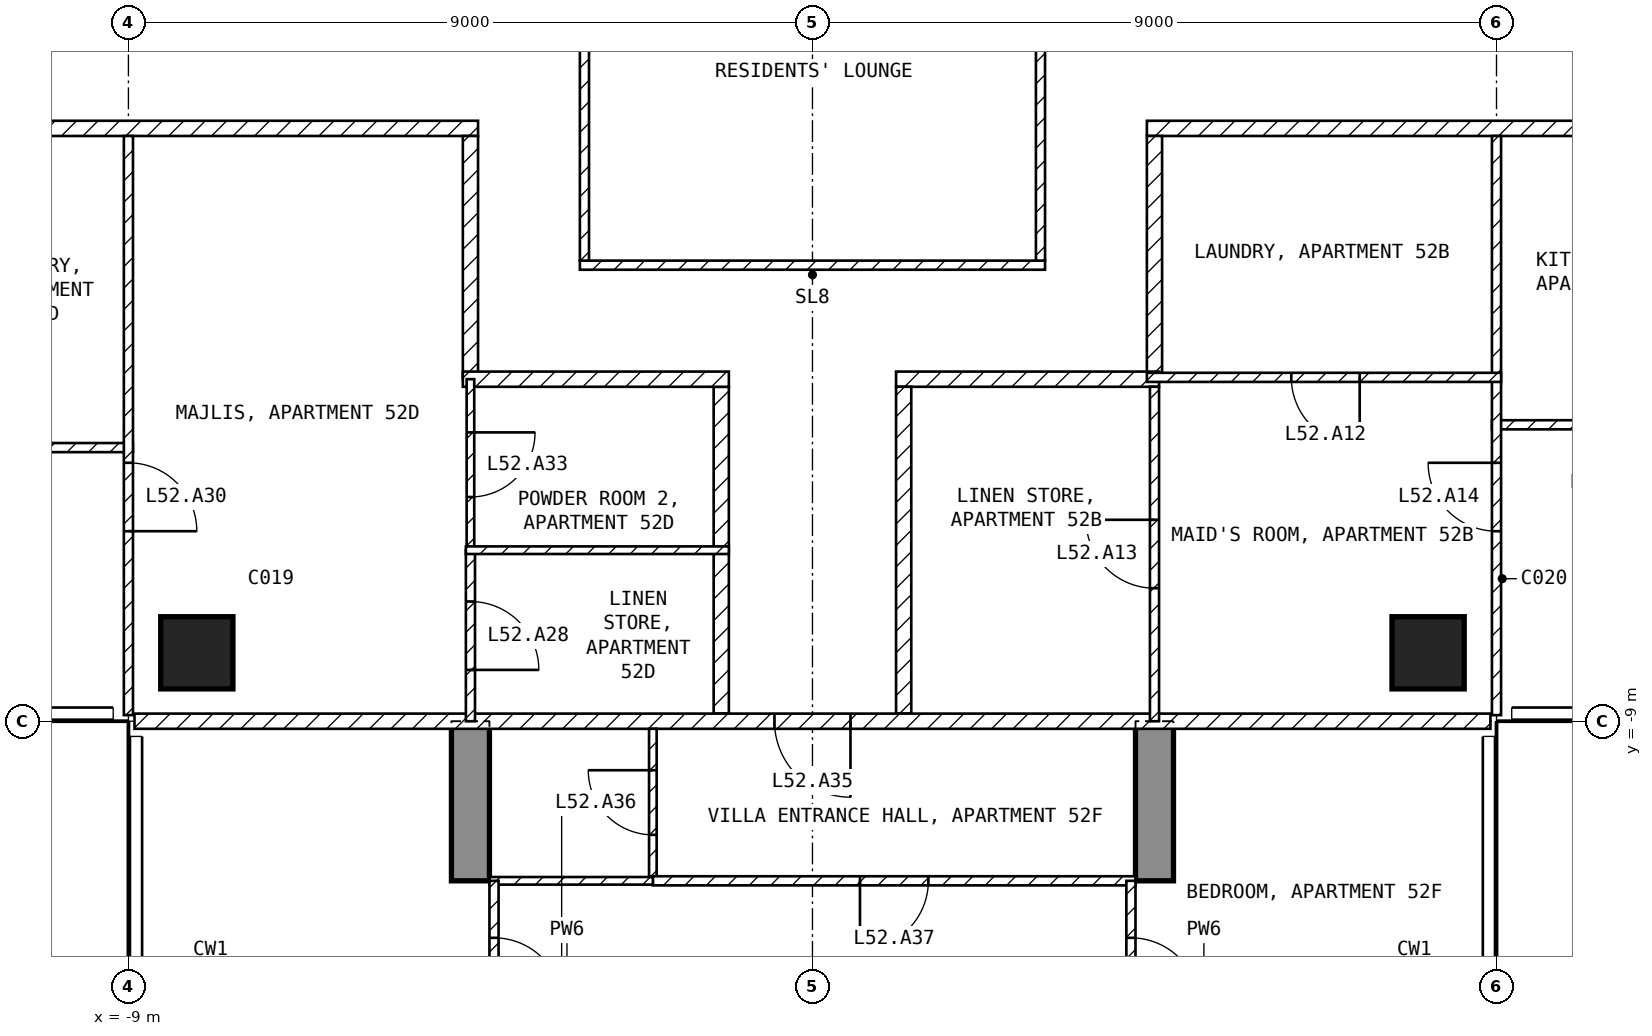
"""IFC4 building model, lengths in metres.
Left out: names, types, materials, properties, quantities, classifications, styles, units other than length and angle.
Written with IfcOpenShell. Run it as: python <this file> out.ifc"""

import sys

from ifc_helpers import new_model, si_unit, direction, frame, frame_2d, origin, origin_2d, place, context, subcontext, project, spatial, polyline, rectangle, outline, extrude, element, fill, save


model = new_model("IFC4")
c1 = context("Model", 3, precision=1e-05, world=origin(), true_north=direction((0.0, 1.0)))
c2 = subcontext(c1, "Body", "Model", "MODEL_VIEW")
j1 = project(units=[si_unit("LENGTHUNIT", "METRE"), si_unit("PLANEANGLEUNIT", "RADIAN")], contexts=[c1])
p1 = place(None, origin())
s1 = spatial("IfcSite", under=j1, at=p1, CompositionType="ELEMENT")
p2 = place(p1, origin())
s2 = spatial("IfcBuilding", under=s1, at=p2, CompositionType="ELEMENT")
p3 = place(p2, frame((0.0, 0.0, 208.6)))
s3 = spatial("IfcBuildingStorey", under=s2, at=p3, CompositionType="ELEMENT", Elevation=208.6)
for number, where, z_axis, x_axis in (
    (1, (-8.1, -8.1, -0.25), (0.0, 0.0, 1.0), (1.0, 0.0, 0.0)),
    (2, (8.1, -8.1, -0.25), (0.0, 0.0, 1.0), (1.0, 0.0, 0.0)),
):
    element("IfcColumn", number, at=place(p3, frame(where, z_axis=z_axis, x_axis=x_axis)), inside=s3, PredefinedType="COLUMN", context=c2, shape_type="SweptSolid", body=[
        extrude(rectangle(XDim=0.95, YDim=0.95, at=origin_2d()), origin(), (0.0, 0.0, 1.0), 3.5),
    ])
for number, where, z_axis, x_axis in (
    (3, (-4.75, -20.225, -0.25), (1.0, 0.0, 0.0), (0.0, 1.0, 0.0)),
    (4, (4.25, -20.225, -0.25), (1.0, 0.0, 0.0), (0.0, 1.0, 0.0)),
):
    element("IfcWall", number, at=place(p3, frame(where, z_axis=z_axis, x_axis=x_axis)), inside=s3, PredefinedType="SHEAR", context=c2, shape_type="SweptSolid", body=[
        extrude(outline(polyline([(0.0, 0.0), (6.725, 0.0), (6.725, 2.65), (9.125, 2.65), (9.125, 0.0), (11.225, 0.0), (11.225, 3.5), (0.0, 3.5), (0.0, 0.0)])), origin(), (0.0, 0.0, 1.0), 0.5),
    ])
p4 = place(p3, frame((-3.06, -3.0, 0.0), z_axis=(0.0, 0.0, 1.0), x_axis=(1.0, 0.0, 0.0)))
e5 = element("IfcWall", 5, at=p4, inside=s3, PredefinedType="PARTITIONING", context=c2, shape_type="SweptSolid", body=[
    extrude(rectangle(XDim=6.12, YDim=0.12, at=frame_2d((3.06, 0.0))), origin(), (0.0, 0.0, 1.0), 3.25),
])
for number, where, z_axis, x_axis in (
    (6, (3.0, -2.94, 0.0), (0.0, 0.0, 1.0), (0.0, 1.0, 0.0)),
    (7, (-3.0, 2.94, 0.0), (0.0, 0.0, 1.0), (0.0, -1.0, 0.0)),
):
    element("IfcWall", number, at=place(p3, frame(where, z_axis=z_axis, x_axis=x_axis)), inside=s3, PredefinedType="PARTITIONING", context=c2, shape_type="SweptSolid", body=[
        extrude(rectangle(XDim=5.88, YDim=0.12, at=frame_2d((2.94, 0.0))), origin(), (0.0, 0.0, 1.0), 3.25),
    ])
p5 = place(p3, frame((21.6, -1.2, 0.0), z_axis=(0.0, 0.0, 1.0), x_axis=(-1.0, 0.0, 0.0)))
e8 = element("IfcWall", 8, at=p5, inside=s3, PredefinedType="PARTITIONING", context=c2, shape_type="SweptSolid", body=[
    extrude(rectangle(XDim=17.2, YDim=0.2, at=frame_2d((8.6, 0.0))), origin(), (0.0, 0.0, 1.0), 3.25),
])
p6 = place(p5, frame((4.675, 0.0, 0.0)))
e9 = element("IfcOpeningElement", 9, at=p6, cuts=e8, PredefinedType="OPENING", context=c2, shape_type="SweptSolid", body=[
    extrude(rectangle(XDim=1.0, YDim=2.1, at=frame_2d((0.5, 1.05))), frame((0.0, 0.11, 0.0), z_axis=(0.0, -1.0, 0.0), x_axis=(1.0, 0.0, 0.0)), (0.0, 0.0, 1.0), 0.22),
])
p7 = place(p3, frame((4.5, -1.3, 0.0), z_axis=(0.0, 0.0, 1.0), x_axis=(0.0, -1.0, 0.0)))
e10 = element("IfcWall", 10, at=p7, inside=s3, PredefinedType="PARTITIONING", context=c2, shape_type="SweptSolid", body=[
    extrude(rectangle(XDim=3.116, YDim=0.2, at=frame_2d((1.558, 0.0))), origin(), (0.0, 0.0, 1.0), 3.25),
])
p8 = place(p3, frame((4.56, -4.5, 0.0), z_axis=(0.0, 0.0, 1.0), x_axis=(-1.0, 0.0, 0.0)))
e11 = element("IfcWall", 11, at=p8, inside=s3, PredefinedType="PARTITIONING", context=c2, shape_type="SweptSolid", body=[
    extrude(rectangle(XDim=3.46, YDim=0.2, at=frame_2d((1.73, 0.0))), origin(), (0.0, 0.0, 1.0), 3.25),
])
p9 = place(p3, frame((1.2, -4.6, 0.0), z_axis=(0.0, 0.0, 1.0), x_axis=(0.0, -1.0, 0.0)))
e12 = element("IfcWall", 12, at=p9, inside=s3, PredefinedType="PARTITIONING", context=c2, shape_type="SweptSolid", body=[
    extrude(rectangle(XDim=4.3, YDim=0.2, at=frame_2d((2.15, 0.0))), origin(), (0.0, 0.0, 1.0), 3.25),
])
p10 = place(p3, frame((-4.4, -1.2, 0.0), z_axis=(0.0, 0.0, 1.0), x_axis=(-1.0, 0.0, 0.0)))
e13 = element("IfcWall", 13, at=p10, inside=s3, PredefinedType="PARTITIONING", context=c2, shape_type="SweptSolid", body=[
    extrude(rectangle(XDim=17.2, YDim=0.2, at=frame_2d((8.6, 0.0))), origin(), (0.0, 0.0, 1.0), 3.25),
])
p11 = place(p10, frame((7.7, 0.0, 0.0)))
e14 = element("IfcOpeningElement", 14, at=p11, cuts=e13, PredefinedType="OPENING", context=c2, shape_type="SweptSolid", body=[
    extrude(rectangle(XDim=1.0, YDim=2.1, at=frame_2d((0.5, 1.05))), frame((0.0, 0.11, 0.0), z_axis=(0.0, -1.0, 0.0), x_axis=(1.0, 0.0, 0.0)), (0.0, 0.0, 1.0), 0.22),
])
p12 = place(p3, frame((-4.5, -4.5, 0.0), z_axis=(0.0, 0.0, 1.0), x_axis=(0.0, 1.0, 0.0)))
e15 = element("IfcWall", 15, at=p12, inside=s3, PredefinedType="PARTITIONING", context=c2, shape_type="SweptSolid", body=[
    extrude(rectangle(XDim=3.2, YDim=0.2, at=frame_2d((1.6, 0.0))), origin(), (0.0, 0.0, 1.0), 3.25),
])
p13 = place(p3, frame((-1.2, -8.9, 0.0), z_axis=(0.0, 0.0, 1.0), x_axis=(0.0, 1.0, 0.0)))
e16 = element("IfcWall", 16, at=p13, inside=s3, PredefinedType="PARTITIONING", context=c2, shape_type="SweptSolid", body=[
    extrude(rectangle(XDim=4.3, YDim=0.2, at=frame_2d((2.15, 0.0))), origin(), (0.0, 0.0, 1.0), 3.25),
])
p14 = place(p3, frame((-1.1, -4.5, 0.0), z_axis=(0.0, 0.0, 1.0), x_axis=(-1.0, 0.0, 0.0)))
e17 = element("IfcWall", 17, at=p14, inside=s3, PredefinedType="PARTITIONING", context=c2, shape_type="SweptSolid", body=[
    extrude(rectangle(XDim=3.5, YDim=0.2, at=frame_2d((1.75, 0.0))), origin(), (0.0, 0.0, 1.0), 3.25),
])
p15 = place(p3, frame((8.92, -9.0, 0.0), z_axis=(0.0, 0.0, 1.0), x_axis=(-1.0, 0.0, 0.0)))
e18 = element("IfcWall", 18, at=p15, inside=s3, PredefinedType="PARTITIONING", context=c2, shape_type="SweptSolid", body=[
    extrude(rectangle(XDim=17.84, YDim=0.2, at=frame_2d((8.92, 0.0))), origin(), (0.0, 0.0, 1.0), 3.25),
])
p16 = place(p15, frame((8.42, 0.0, 0.0)))
e19 = element("IfcOpeningElement", 19, at=p16, cuts=e18, PredefinedType="OPENING", context=c2, shape_type="SweptSolid", body=[
    extrude(rectangle(XDim=1.0, YDim=2.1, at=frame_2d((0.5, 1.05))), frame((0.0, 0.11, 0.0), z_axis=(0.0, -1.0, 0.0), x_axis=(1.0, 0.0, 0.0)), (0.0, 0.0, 1.0), 0.22),
])
p17 = place(p3, frame((19.5, -5.1, 0.0), z_axis=(0.0, 0.0, 1.0), x_axis=(-1.0, 0.0, 0.0)))
e20 = element("IfcWall", 20, at=p17, inside=s3, PredefinedType="PARTITIONING", context=c2, shape_type="SweptSolid", body=[
    extrude(rectangle(XDim=10.56, YDim=0.12, at=frame_2d((5.28, 0.0))), origin(), (0.0, 0.0, 1.0), 3.25),
])
p18 = place(p17, frame((8.55, 0.0, 0.0)))
e21 = element("IfcOpeningElement", 21, at=p18, cuts=e20, PredefinedType="OPENING", context=c2, shape_type="SweptSolid", body=[
    extrude(rectangle(XDim=0.9, YDim=2.1, at=frame_2d((0.45, 1.05))), frame((0.0, 0.07, 0.0), z_axis=(0.0, -1.0, 0.0), x_axis=(1.0, 0.0, 0.0)), (0.0, 0.0, 1.0), 0.14),
])
p19 = place(p17, frame((2.625, 0.0, 0.0)))
e22 = element("IfcOpeningElement", 22, at=p19, cuts=e20, PredefinedType="OPENING", context=c2, shape_type="SweptSolid", body=[
    extrude(rectangle(XDim=0.9, YDim=2.1, at=frame_2d((0.45, 1.05))), frame((0.0, 0.07, 0.0), z_axis=(0.0, -1.0, 0.0), x_axis=(1.0, 0.0, 0.0)), (0.0, 0.0, 1.0), 0.14),
])
p20 = place(p3, frame((9.0, -8.92, 0.0), z_axis=(0.0, 0.0, 1.0), x_axis=(0.0, 1.0, 0.0)))
e23 = element("IfcWall", 23, at=p20, inside=s3, PredefinedType="PARTITIONING", context=c2, shape_type="SweptSolid", body=[
    extrude(rectangle(XDim=7.62, YDim=0.12, at=frame_2d((3.81, 0.0))), origin(), (0.0, 0.0, 1.0), 3.25),
])
p21 = place(p20, frame((2.42, 0.0, 0.0)))
e24 = element("IfcOpeningElement", 24, at=p21, cuts=e23, PredefinedType="OPENING", context=c2, shape_type="SweptSolid", body=[
    extrude(rectangle(XDim=0.9, YDim=2.1, at=frame_2d((0.45, 1.05))), frame((0.0, 0.07, 0.0), z_axis=(0.0, -1.0, 0.0), x_axis=(1.0, 0.0, 0.0)), (0.0, 0.0, 1.0), 0.14),
])
p22 = place(p3, frame((9.06, -4.476, 0.0), z_axis=(0.0, 0.0, 1.0), x_axis=(-1.0, 0.0, 0.0)))
e25 = element("IfcWall", 25, at=p22, inside=s3, PredefinedType="PARTITIONING", context=c2, shape_type="SweptSolid", body=[
    extrude(rectangle(XDim=4.66, YDim=0.12, at=frame_2d((2.33, 0.0))), origin(), (0.0, 0.0, 1.0), 3.25),
])
p23 = place(p22, frame((1.86, 0.0, 0.0)))
e26 = element("IfcOpeningElement", 26, at=p23, cuts=e25, PredefinedType="OPENING", context=c2, shape_type="SweptSolid", body=[
    extrude(rectangle(XDim=0.9, YDim=2.1, at=frame_2d((0.45, 1.05))), frame((0.0, 0.07, 0.0), z_axis=(0.0, -1.0, 0.0), x_axis=(1.0, 0.0, 0.0)), (0.0, 0.0, 1.0), 0.14),
])
p24 = place(p3, frame((4.5, -9.0, 0.0), z_axis=(0.0, 0.0, 1.0), x_axis=(0.0, 1.0, 0.0)))
e27 = element("IfcWall", 27, at=p24, inside=s3, PredefinedType="PARTITIONING", context=c2, shape_type="SweptSolid", body=[
    extrude(rectangle(XDim=4.4, YDim=0.12, at=frame_2d((2.2, 0.0))), origin(), (0.0, 0.0, 1.0), 3.25),
])
p25 = place(p24, frame((1.75, 0.0, 0.0)))
e28 = element("IfcOpeningElement", 28, at=p25, cuts=e27, PredefinedType="OPENING", context=c2, shape_type="SweptSolid", body=[
    extrude(rectangle(XDim=0.9, YDim=2.1, at=frame_2d((0.45, 1.05))), frame((0.0, 0.07, 0.0), z_axis=(0.0, -1.0, 0.0), x_axis=(1.0, 0.0, 0.0)), (0.0, 0.0, 1.0), 0.14),
])
p26 = place(p3, frame((-8.94, -5.4, 0.0), z_axis=(0.0, 0.0, 1.0), x_axis=(-1.0, 0.0, 0.0)))
e29 = element("IfcWall", 29, at=p26, inside=s3, PredefinedType="PARTITIONING", context=c2, shape_type="SweptSolid", body=[
    extrude(rectangle(XDim=9.51, YDim=0.12, at=frame_2d((4.755, 0.0))), origin(), (0.0, 0.0, 1.0), 3.25),
])
p27 = place(p26, frame((3.21, 0.0, 0.0)))
e30 = element("IfcOpeningElement", 30, at=p27, cuts=e29, PredefinedType="OPENING", context=c2, shape_type="SweptSolid", body=[
    extrude(rectangle(XDim=0.9, YDim=2.1, at=frame_2d((0.45, 1.05))), frame((0.0, 0.07, 0.0), z_axis=(0.0, -1.0, 0.0), x_axis=(1.0, 0.0, 0.0)), (0.0, 0.0, 1.0), 0.14),
])
p28 = place(p3, frame((-9.0, -1.3, 0.0), z_axis=(0.0, 0.0, 1.0), x_axis=(0.0, -1.0, 0.0)))
e31 = element("IfcWall", 31, at=p28, inside=s3, PredefinedType="PARTITIONING", context=c2, shape_type="SweptSolid", body=[
    extrude(rectangle(XDim=7.62, YDim=0.12, at=frame_2d((3.81, 0.0))), origin(), (0.0, 0.0, 1.0), 3.25),
])
p29 = place(p28, frame((4.3, 0.0, 0.0)))
e32 = element("IfcOpeningElement", 32, at=p29, cuts=e31, PredefinedType="OPENING", context=c2, shape_type="SweptSolid", body=[
    extrude(rectangle(XDim=0.9, YDim=2.1, at=frame_2d((0.45, 1.05))), frame((0.0, 0.07, 0.0), z_axis=(0.0, -1.0, 0.0), x_axis=(1.0, 0.0, 0.0)), (0.0, 0.0, 1.0), 0.14),
])
p30 = place(p3, frame((-4.5, -4.5, 0.0), z_axis=(0.0, 0.0, 1.0), x_axis=(0.0, -1.0, 0.0)))
e33 = element("IfcWall", 33, at=p30, inside=s3, PredefinedType="PARTITIONING", context=c2, shape_type="SweptSolid", body=[
    extrude(rectangle(XDim=2.25, YDim=0.1, at=frame_2d((1.125, 0.0))), origin(), (0.0, 0.0, 1.0), 3.25),
])
p31 = place(p30, frame((0.7, 0.0, 0.0)))
e34 = element("IfcOpeningElement", 34, at=p31, cuts=e33, PredefinedType="OPENING", context=c2, shape_type="SweptSolid", body=[
    extrude(rectangle(XDim=0.85, YDim=2.1, at=frame_2d((0.425, 1.05))), frame((0.0, 0.06, 0.0), z_axis=(0.0, -1.0, 0.0), x_axis=(1.0, 0.0, 0.0)), (0.0, 0.0, 1.0), 0.12),
])
p32 = place(p3, frame((-4.5, -6.75, 0.0), z_axis=(0.0, 0.0, 1.0), x_axis=(0.0, -1.0, 0.0)))
e35 = element("IfcWall", 35, at=p32, inside=s3, PredefinedType="PARTITIONING", context=c2, shape_type="SweptSolid", body=[
    extrude(rectangle(XDim=2.25, YDim=0.12, at=frame_2d((1.125, 0.0))), origin(), (0.0, 0.0, 1.0), 3.25),
])
p33 = place(p32, frame((0.675, 0.0, 0.0)))
e36 = element("IfcOpeningElement", 36, at=p33, cuts=e35, PredefinedType="OPENING", context=c2, shape_type="SweptSolid", body=[
    extrude(rectangle(XDim=0.9, YDim=2.1, at=frame_2d((0.45, 1.05))), frame((0.0, 0.07, 0.0), z_axis=(0.0, -1.0, 0.0), x_axis=(1.0, 0.0, 0.0)), (0.0, 0.0, 1.0), 0.14),
])
p34 = place(p3, frame((-1.1, -6.75, 0.0), z_axis=(0.0, 0.0, 1.0), x_axis=(-1.0, 0.0, 0.0)))
e37 = element("IfcWall", 37, at=p34, inside=s3, PredefinedType="PARTITIONING", context=c2, shape_type="SweptSolid", body=[
    extrude(rectangle(XDim=3.46, YDim=0.1, at=frame_2d((1.73, 0.0))), origin(), (0.0, 0.0, 1.0), 3.25),
])
p35 = place(p3, frame((-2.1, -11.04, 0.0), z_axis=(0.0, 0.0, 1.0), x_axis=(0.0, 1.0, 0.0)))
e38 = element("IfcWall", 38, at=p35, inside=s3, PredefinedType="PARTITIONING", context=c2, shape_type="SweptSolid", body=[
    extrude(rectangle(XDim=1.94, YDim=0.1, at=frame_2d((0.97, 0.0))), origin(), (0.0, 0.0, 1.0), 3.25),
])
p36 = place(p35, frame((0.545, 0.0, 0.0)))
e39 = element("IfcOpeningElement", 39, at=p36, cuts=e38, PredefinedType="OPENING", context=c2, shape_type="SweptSolid", body=[
    extrude(rectangle(XDim=0.85, YDim=2.1, at=frame_2d((0.425, 1.05))), frame((0.0, 0.06, 0.0), z_axis=(0.0, -1.0, 0.0), x_axis=(1.0, 0.0, 0.0)), (0.0, 0.0, 1.0), 0.12),
])
p37 = place(p3, frame((4.25, -11.1, 0.0), z_axis=(0.0, 0.0, 1.0), x_axis=(-1.0, 0.0, 0.0)))
e40 = element("IfcWall", 40, at=p37, inside=s3, PredefinedType="PARTITIONING", context=c2, shape_type="SweptSolid", body=[
    extrude(rectangle(XDim=6.35, YDim=0.12, at=frame_2d((3.175, 0.0))), origin(), (0.0, 0.0, 1.0), 3.25),
])
p38 = place(p37, frame((2.725, 0.0, 0.0)))
e41 = element("IfcOpeningElement", 41, at=p38, cuts=e40, PredefinedType="OPENING", context=c2, shape_type="SweptSolid", body=[
    extrude(rectangle(XDim=0.9, YDim=2.1, at=frame_2d((0.45, 1.05))), frame((0.0, 0.07, 0.0), z_axis=(0.0, -1.0, 0.0), x_axis=(1.0, 0.0, 0.0)), (0.0, 0.0, 1.0), 0.14),
])
p39 = place(p3, frame((-2.1, -11.1, 0.0), z_axis=(0.0, 0.0, 1.0), x_axis=(-1.0, 0.0, 0.0)))
e42 = element("IfcWall", 42, at=p39, inside=s3, PredefinedType="PARTITIONING", context=c2, shape_type="SweptSolid", body=[
    extrude(rectangle(XDim=2.15, YDim=0.1, at=frame_2d((1.075, 0.0))), origin(), (0.0, 0.0, 1.0), 3.25),
])
p40 = place(p3, frame((4.19, -11.1, 0.0), z_axis=(0.0, 0.0, 1.0), x_axis=(0.0, -1.0, 0.0)))
e43 = element("IfcWall", 43, at=p40, inside=s3, PredefinedType="PARTITIONING", context=c2, shape_type="SweptSolid", body=[
    extrude(rectangle(XDim=2.4, YDim=0.12, at=frame_2d((1.2, 0.0))), origin(), (0.0, 0.0, 1.0), 2.4),
])
p41 = place(p40, frame((0.75, 0.0, 0.0)))
e44 = element("IfcOpeningElement", 44, at=p41, cuts=e43, PredefinedType="OPENING", context=c2, shape_type="SweptSolid", body=[
    extrude(rectangle(XDim=0.9, YDim=2.1, at=frame_2d((0.45, 1.05))), frame((0.0, 0.07, 0.0), z_axis=(0.0, -1.0, 0.0), x_axis=(1.0, 0.0, 0.0)), (0.0, 0.0, 1.0), 0.14),
])
p42 = place(p3, frame((-4.19, -11.1, 0.0), z_axis=(0.0, 0.0, 1.0), x_axis=(0.0, -1.0, 0.0)))
e45 = element("IfcWall", 45, at=p42, inside=s3, PredefinedType="PARTITIONING", context=c2, shape_type="SweptSolid", body=[
    extrude(rectangle(XDim=2.4, YDim=0.12, at=frame_2d((1.2, 0.0))), origin(), (0.0, 0.0, 1.0), 2.4),
])
p43 = place(p42, frame((0.75, 0.0, 0.0)))
e46 = element("IfcOpeningElement", 46, at=p43, cuts=e45, PredefinedType="OPENING", context=c2, shape_type="SweptSolid", body=[
    extrude(rectangle(XDim=0.9, YDim=2.1, at=frame_2d((0.45, 1.05))), frame((0.0, 0.07, 0.0), z_axis=(0.0, -1.0, 0.0), x_axis=(1.0, 0.0, 0.0)), (0.0, 0.0, 1.0), 0.14),
])
p44 = place(p23, origin())
e47 = element("IfcDoor", 47, at=p44, inside=s3, OperationType="SINGLE_SWING_LEFT", PredefinedType="DOOR", context=c2, shape_type="SweptSolid", body=[
    extrude(rectangle(XDim=0.9, YDim=2.1, at=frame_2d((0.45, 1.05))), frame((0.0, 0.025, 0.0), z_axis=(0.0, -1.0, 0.0), x_axis=(1.0, 0.0, 0.0)), (0.0, 0.0, 1.0), 0.05),
])
fill(e26, e47)
p45 = place(p25, origin())
e48 = element("IfcDoor", 48, at=p45, inside=s3, OperationType="SINGLE_SWING_RIGHT", PredefinedType="DOOR", context=c2, shape_type="SweptSolid", body=[
    extrude(rectangle(XDim=0.9, YDim=2.1, at=frame_2d((0.45, 1.05))), frame((0.0, 0.025, 0.0), z_axis=(0.0, -1.0, 0.0), x_axis=(1.0, 0.0, 0.0)), (0.0, 0.0, 1.0), 0.05),
])
fill(e28, e48)
p46 = place(p21, origin())
e49 = element("IfcDoor", 49, at=p46, inside=s3, OperationType="SINGLE_SWING_RIGHT", PredefinedType="DOOR", context=c2, shape_type="SweptSolid", body=[
    extrude(rectangle(XDim=0.9, YDim=2.1, at=frame_2d((0.45, 1.05))), frame((0.0, 0.025, 0.0), z_axis=(0.0, -1.0, 0.0), x_axis=(1.0, 0.0, 0.0)), (0.0, 0.0, 1.0), 0.05),
])
fill(e24, e49)
p47 = place(p33, origin())
e50 = element("IfcDoor", 50, at=p47, inside=s3, OperationType="SINGLE_SWING_RIGHT", PredefinedType="DOOR", context=c2, shape_type="SweptSolid", body=[
    extrude(rectangle(XDim=0.9, YDim=2.1, at=frame_2d((0.45, 1.05))), frame((0.0, 0.025, 0.0), z_axis=(0.0, -1.0, 0.0), x_axis=(1.0, 0.0, 0.0)), (0.0, 0.0, 1.0), 0.05),
])
fill(e36, e50)
p48 = place(p29, origin())
e51 = element("IfcDoor", 51, at=p48, inside=s3, OperationType="SINGLE_SWING_RIGHT", PredefinedType="DOOR", context=c2, shape_type="SweptSolid", body=[
    extrude(rectangle(XDim=0.9, YDim=2.1, at=frame_2d((0.45, 1.05))), frame((0.0, 0.025, 0.0), z_axis=(0.0, -1.0, 0.0), x_axis=(1.0, 0.0, 0.0)), (0.0, 0.0, 1.0), 0.05),
])
fill(e32, e51)
p49 = place(p31, origin())
e52 = element("IfcDoor", 52, at=p49, inside=s3, OperationType="SINGLE_SWING_LEFT", PredefinedType="DOOR", context=c2, shape_type="SweptSolid", body=[
    extrude(rectangle(XDim=0.85, YDim=2.1, at=frame_2d((0.425, 1.05))), frame((0.0, 0.025, 0.0), z_axis=(0.0, -1.0, 0.0), x_axis=(1.0, 0.0, 0.0)), (0.0, 0.0, 1.0), 0.05),
])
fill(e34, e52)
p50 = place(p16, origin())
e53 = element("IfcDoor", 53, at=p50, inside=s3, OperationType="SINGLE_SWING_LEFT", PredefinedType="DOOR", context=c2, shape_type="SweptSolid", body=[
    extrude(rectangle(XDim=1.0, YDim=2.1, at=frame_2d((0.5, 1.05))), frame((0.0, 0.025, 0.0), z_axis=(0.0, -1.0, 0.0), x_axis=(1.0, 0.0, 0.0)), (0.0, 0.0, 1.0), 0.05),
])
fill(e19, e53)
p51 = place(p36, origin())
e54 = element("IfcDoor", 54, at=p51, inside=s3, OperationType="SINGLE_SWING_RIGHT", PredefinedType="DOOR", context=c2, shape_type="SweptSolid", body=[
    extrude(rectangle(XDim=0.85, YDim=2.1, at=frame_2d((0.425, 1.05))), frame((0.0, 0.025, 0.0), z_axis=(0.0, -1.0, 0.0), x_axis=(1.0, 0.0, 0.0)), (0.0, 0.0, 1.0), 0.05),
])
fill(e39, e54)
p52 = place(p38, origin())
e55 = element("IfcDoor", 55, at=p52, inside=s3, OperationType="SINGLE_SWING_RIGHT", PredefinedType="DOOR", context=c2, shape_type="SweptSolid", body=[
    extrude(rectangle(XDim=0.9, YDim=2.1, at=frame_2d((0.45, 1.05))), frame((0.0, 0.025, 0.0), z_axis=(0.0, -1.0, 0.0), x_axis=(1.0, 0.0, 0.0)), (0.0, 0.0, 1.0), 0.05),
])
fill(e41, e55)
p53 = place(p41, origin())
e56 = element("IfcDoor", 56, at=p53, inside=s3, OperationType="SINGLE_SWING_RIGHT", PredefinedType="DOOR", context=c2, shape_type="SweptSolid", body=[
    extrude(rectangle(XDim=0.9, YDim=2.1, at=frame_2d((0.45, 1.05))), frame((0.0, 0.025, 0.0), z_axis=(0.0, -1.0, 0.0), x_axis=(1.0, 0.0, 0.0)), (0.0, 0.0, 1.0), 0.05),
])
fill(e44, e56)
p54 = place(p43, origin())
e57 = element("IfcDoor", 57, at=p54, inside=s3, OperationType="SINGLE_SWING_RIGHT", PredefinedType="DOOR", context=c2, shape_type="SweptSolid", body=[
    extrude(rectangle(XDim=0.9, YDim=2.1, at=frame_2d((0.45, 1.05))), frame((0.0, 0.025, 0.0), z_axis=(0.0, -1.0, 0.0), x_axis=(1.0, 0.0, 0.0)), (0.0, 0.0, 1.0), 0.05),
])
fill(e46, e57)
save(model, sys.argv[1])
